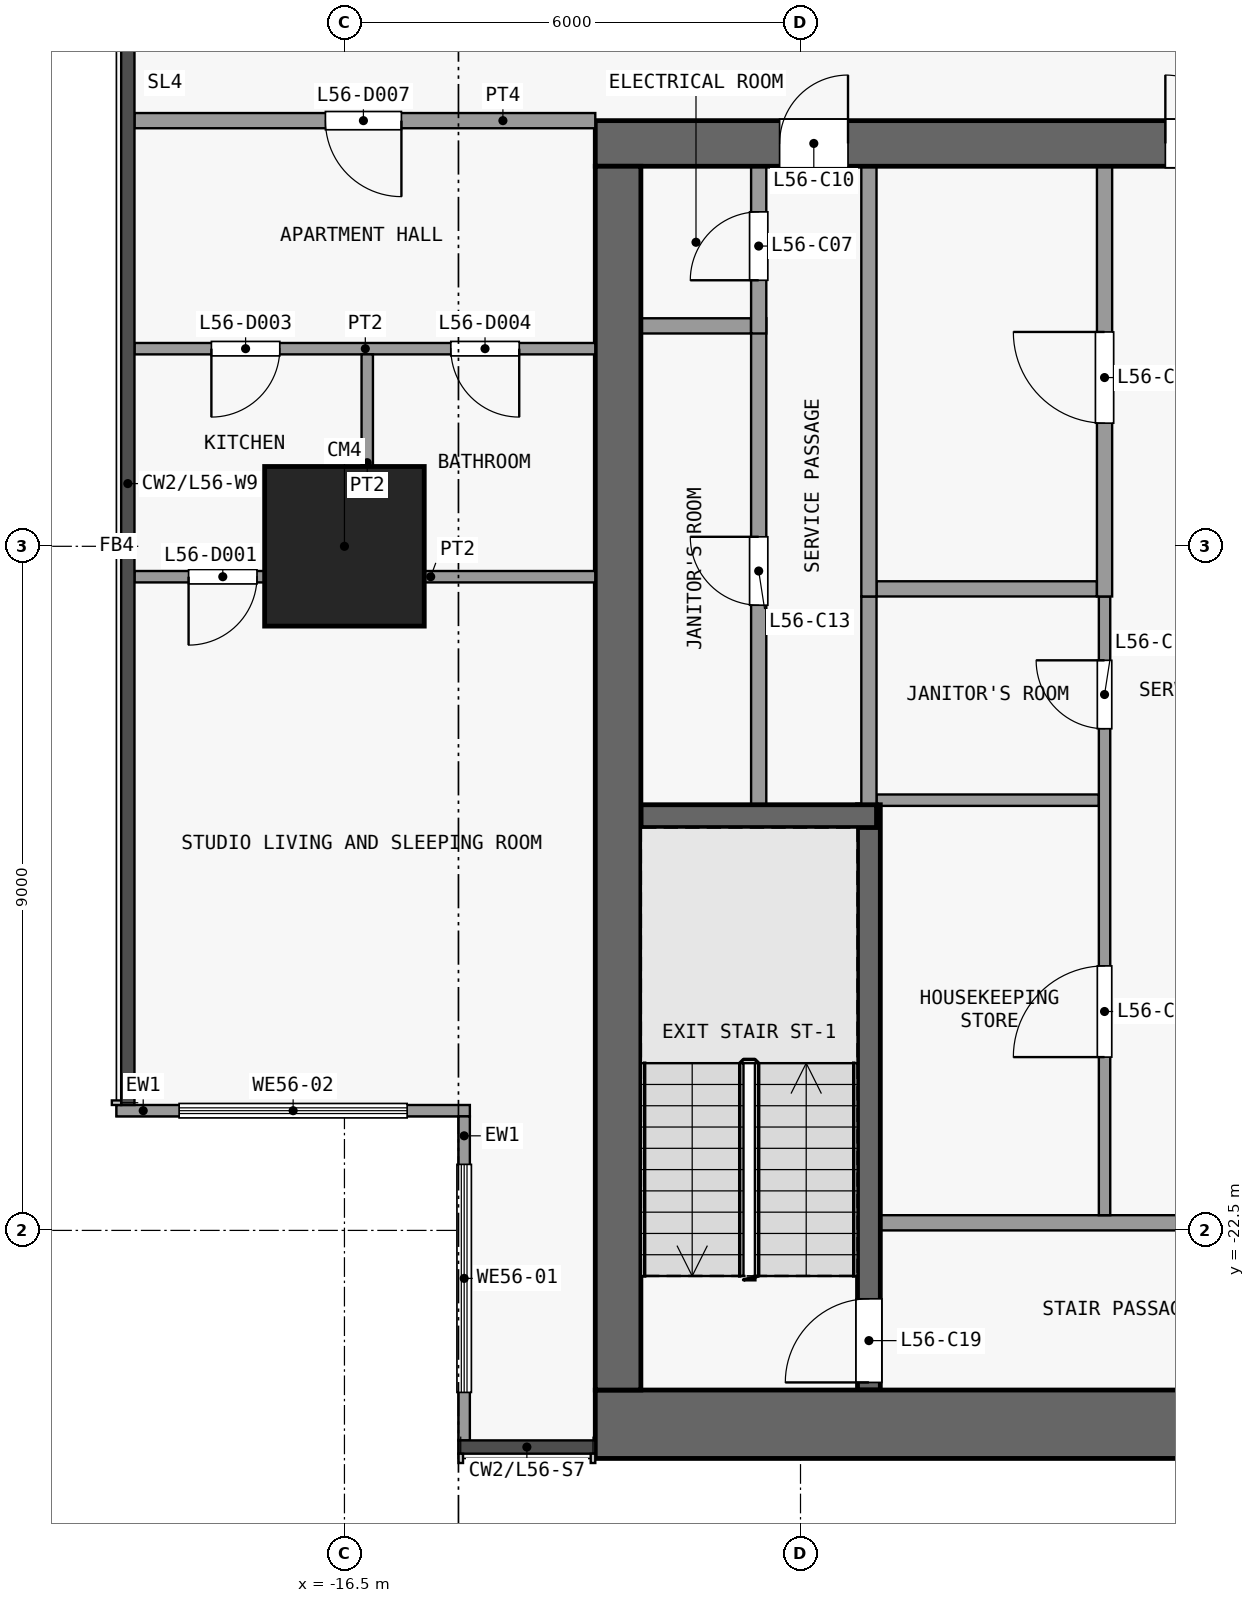
"""IFC4 building model, lengths in metres.
Left out: names, types, materials, properties, quantities, classifications, styles, units other than length and angle.
Written with IfcOpenShell. Run it as: python <this file> out.ifc"""

import sys

from ifc_helpers import new_model, si_unit, direction, frame, frame_2d, origin, origin_2d, place, context, subcontext, project, spatial, rectangle, extrude, element, fill, save


model = new_model("IFC4")
c1 = context("Model", 3, precision=1e-05, world=origin(), true_north=direction((0.0, 1.0)))
c2 = subcontext(c1, "Body", "Model", "MODEL_VIEW")
j1 = project(units=[si_unit("LENGTHUNIT", "METRE"), si_unit("PLANEANGLEUNIT", "RADIAN")], contexts=[c1])
p1 = place(None, origin())
s1 = spatial("IfcSite", under=j1, at=p1, CompositionType="ELEMENT")
p2 = place(p1, origin())
s2 = spatial("IfcBuilding", under=s1, at=p2, CompositionType="ELEMENT")
p3 = place(p2, frame((0.0, 0.0, 223.1)))
s3 = spatial("IfcBuildingStorey", under=s2, at=p3, CompositionType="ELEMENT", Elevation=223.1)
p4 = place(p3, frame((-16.5, -13.5, 0.0), z_axis=(0.0, 0.0, 1.0), x_axis=(1.0, 0.0, 0.0)))
e1 = element("IfcColumn", 1, at=p4, inside=s3, PredefinedType="COLUMN", context=c2, shape_type="SweptSolid", body=[
    extrude(rectangle(XDim=2.1, YDim=2.1, at=origin_2d()), origin(), (0.0, 0.0, 1.0), 3.6),
])
p5 = place(p3, frame((-13.2, -25.05, 0.0), z_axis=(0.0, 0.0, 1.0), x_axis=(1.0, 0.0, 0.0)))
e2 = element("IfcWall", 2, at=p5, inside=s3, PredefinedType="SHEAR", context=c2, shape_type="SweptSolid", body=[
    extrude(rectangle(XDim=26.4, YDim=0.9, at=frame_2d((13.2, 0.0))), origin(), (0.0, 0.0, 1.0), 3.3),
])
p6 = place(p3, frame((-13.2, -8.2, 0.0), z_axis=(0.0, 0.0, 1.0), x_axis=(1.0, 0.0, 0.0)))
e3 = element("IfcWall", 3, at=p6, inside=s3, PredefinedType="SHEAR", context=c2, shape_type="SweptSolid", body=[
    extrude(rectangle(XDim=26.4, YDim=0.6, at=frame_2d((13.2, 0.0))), origin(), (0.0, 0.0, 1.0), 3.3),
])
p7 = place(p6, frame((7.5, 0.0, 0.0)))
e4 = element("IfcOpeningElement", 4, at=p7, cuts=e3, PredefinedType="OPENING", context=c2, shape_type="SweptSolid", body=[
    extrude(rectangle(XDim=1.8, YDim=2.1, at=frame_2d((0.9, 1.05))), frame((0.0, 0.31, 0.0), z_axis=(0.0, -1.0, 0.0), x_axis=(1.0, 0.0, 0.0)), (0.0, 0.0, 1.0), 0.62),
])
p8 = place(p6, frame((17.1, 0.0, 0.0)))
e5 = element("IfcOpeningElement", 5, at=p8, cuts=e3, PredefinedType="OPENING", context=c2, shape_type="SweptSolid", body=[
    extrude(rectangle(XDim=1.8, YDim=2.1, at=frame_2d((0.9, 1.05))), frame((0.0, 0.31, 0.0), z_axis=(0.0, -1.0, 0.0), x_axis=(1.0, 0.0, 0.0)), (0.0, 0.0, 1.0), 0.62),
])
p9 = place(p6, frame((2.425, 0.0, 0.0)))
e6 = element("IfcOpeningElement", 6, at=p9, cuts=e3, PredefinedType="OPENING", context=c2, shape_type="SweptSolid", body=[
    extrude(rectangle(XDim=0.9, YDim=2.1, at=frame_2d((0.45, 1.05))), frame((0.0, 0.31, 0.0), z_axis=(0.0, -1.0, 0.0), x_axis=(1.0, 0.0, 0.0)), (0.0, 0.0, 1.0), 0.62),
])
p10 = place(p6, frame((23.075, 0.0, 0.0)))
e7 = element("IfcOpeningElement", 7, at=p10, cuts=e3, PredefinedType="OPENING", context=c2, shape_type="SweptSolid", body=[
    extrude(rectangle(XDim=0.9, YDim=2.1, at=frame_2d((0.45, 1.05))), frame((0.0, 0.31, 0.0), z_axis=(0.0, -1.0, 0.0), x_axis=(1.0, 0.0, 0.0)), (0.0, 0.0, 1.0), 0.62),
])
p11 = place(p3, frame((-12.9, -24.6, 0.0), z_axis=(0.0, 0.0, 1.0), x_axis=(0.0, 1.0, 0.0)))
e8 = element("IfcWall", 8, at=p11, inside=s3, PredefinedType="SHEAR", context=c2, shape_type="SweptSolid", body=[
    extrude(rectangle(XDim=16.1, YDim=0.6, at=frame_2d((8.05, 0.0))), origin(), (0.0, 0.0, 1.0), 3.3),
])
p12 = place(p3, frame((-3.25, -22.4, 0.0), z_axis=(0.0, 0.0, 1.0), x_axis=(-1.0, 0.0, 0.0)))
e9 = element("IfcWall", 9, at=p12, inside=s3, PredefinedType="PARTITIONING", context=c2, shape_type="SweptSolid", body=[
    extrude(rectangle(XDim=6.2, YDim=0.2, at=frame_2d((3.1, 0.0))), origin(), (0.0, 0.0, 1.0), 3.3),
])
p13 = place(p12, frame((0.8, 0.0, 0.0)))
e10 = element("IfcOpeningElement", 10, at=p13, cuts=e9, PredefinedType="OPENING", context=c2, shape_type="SweptSolid", body=[
    extrude(rectangle(XDim=1.5, YDim=2.1, at=frame_2d((0.75, 1.05))), frame((0.0, 0.11, 0.0), z_axis=(0.0, -1.0, 0.0), x_axis=(1.0, 0.0, 0.0)), (0.0, 0.0, 1.0), 0.22),
])
p14 = place(p3, frame((-12.6, -17.05, 0.0), z_axis=(0.0, 0.0, 1.0), x_axis=(1.0, 0.0, 0.0)))
e11 = element("IfcWall", 11, at=p14, inside=s3, PredefinedType="SHEAR", context=c2, shape_type="SweptSolid", body=[
    extrude(rectangle(XDim=3.1, YDim=0.3, at=frame_2d((1.55, 0.0))), origin(), (0.0, 0.0, 1.0), 3.3),
])
p15 = place(p3, frame((-9.5, -16.84, 0.0), z_axis=(0.0, 0.0, 1.0), x_axis=(1.0, 0.0, 0.0)))
e12 = element("IfcWall", 12, at=p15, inside=s3, PredefinedType="PARTITIONING", context=c2, shape_type="SweptSolid", body=[
    extrude(rectangle(XDim=2.925, YDim=0.15, at=frame_2d((1.462, 0.0))), origin(), (0.0, 0.0, 1.0), 3.3),
])
p16 = place(p3, frame((-9.5, -14.06, 0.0), z_axis=(0.0, 0.0, 1.0), x_axis=(1.0, 0.0, 0.0)))
e13 = element("IfcWall", 13, at=p16, inside=s3, PredefinedType="PARTITIONING", context=c2, shape_type="SweptSolid", body=[
    extrude(rectangle(XDim=2.9, YDim=0.2, at=frame_2d((1.45, 0.0))), origin(), (0.0, 0.0, 1.0), 3.3),
])
p17 = place(p3, frame((-12.6, -10.6, 0.0), z_axis=(0.0, 0.0, 1.0), x_axis=(1.0, 0.0, 0.0)))
e14 = element("IfcWall", 14, at=p17, inside=s3, PredefinedType="PARTITIONING", context=c2, shape_type="SweptSolid", body=[
    extrude(rectangle(XDim=1.45, YDim=0.2, at=frame_2d((0.725, 0.0))), origin(), (0.0, 0.0, 1.0), 3.3),
])
p18 = place(p3, frame((-11.05, -16.9, 0.0), z_axis=(0.0, 0.0, 1.0), x_axis=(0.0, 1.0, 0.0)))
e15 = element("IfcWall", 15, at=p18, inside=s3, PredefinedType="PARTITIONING", context=c2, shape_type="SweptSolid", body=[
    extrude(rectangle(XDim=6.4, YDim=0.2, at=frame_2d((3.2, 0.0))), origin(), (0.0, 0.0, 1.0), 3.3),
])
p19 = place(p18, frame((2.625, 0.0, 0.0)))
e16 = element("IfcOpeningElement", 16, at=p19, cuts=e15, PredefinedType="OPENING", context=c2, shape_type="SweptSolid", body=[
    extrude(rectangle(XDim=0.9, YDim=2.1, at=frame_2d((0.45, 1.05))), frame((0.0, 0.11, 0.0), z_axis=(0.0, -1.0, 0.0), x_axis=(1.0, 0.0, 0.0)), (0.0, 0.0, 1.0), 0.22),
])
p20 = place(p3, frame((-11.05, -10.7, 0.0), z_axis=(0.0, 0.0, 1.0), x_axis=(0.0, 1.0, 0.0)))
e17 = element("IfcWall", 17, at=p20, inside=s3, PredefinedType="PARTITIONING", context=c2, shape_type="SweptSolid", body=[
    extrude(rectangle(XDim=2.2, YDim=0.2, at=frame_2d((1.1, 0.0))), origin(), (0.0, 0.0, 1.0), 3.3),
])
p21 = place(p20, frame((0.7, 0.0, 0.0)))
e18 = element("IfcOpeningElement", 18, at=p21, cuts=e17, PredefinedType="OPENING", context=c2, shape_type="SweptSolid", body=[
    extrude(rectangle(XDim=0.9, YDim=2.1, at=frame_2d((0.45, 1.05))), frame((0.0, 0.11, 0.0), z_axis=(0.0, -1.0, 0.0), x_axis=(1.0, 0.0, 0.0)), (0.0, 0.0, 1.0), 0.22),
])
p22 = place(p3, frame((-9.6, -24.6, 0.0), z_axis=(0.0, 0.0, 1.0), x_axis=(0.0, 1.0, 0.0)))
e19 = element("IfcWall", 19, at=p22, inside=s3, PredefinedType="SHEAR", context=c2, shape_type="SweptSolid", body=[
    extrude(rectangle(XDim=7.7, YDim=0.3, at=frame_2d((3.85, 0.0))), origin(), (0.0, 0.0, 1.0), 3.3),
])
p23 = place(p22, frame((0.1, 0.0, 0.0)))
e20 = element("IfcOpeningElement", 20, at=p23, cuts=e19, PredefinedType="OPENING", context=c2, shape_type="SweptSolid", body=[
    extrude(rectangle(XDim=1.1, YDim=2.1, at=frame_2d((0.55, 1.05))), frame((0.0, 0.16, 0.0), z_axis=(0.0, -1.0, 0.0), x_axis=(1.0, 0.0, 0.0)), (0.0, 0.0, 1.0), 0.32),
])
p24 = place(p3, frame((-9.6, -16.9, 0.0), z_axis=(0.0, 0.0, 1.0), x_axis=(0.0, 1.0, 0.0)))
e21 = element("IfcWall", 21, at=p24, inside=s3, PredefinedType="PARTITIONING", context=c2, shape_type="SweptSolid", body=[
    extrude(rectangle(XDim=2.74, YDim=0.2, at=frame_2d((1.37, 0.0))), origin(), (0.0, 0.0, 1.0), 3.3),
])
p25 = place(p3, frame((-9.6, -14.16, 0.0), z_axis=(0.0, 0.0, 1.0), x_axis=(0.0, 1.0, 0.0)))
e22 = element("IfcWall", 22, at=p25, inside=s3, PredefinedType="PARTITIONING", context=c2, shape_type="SweptSolid", body=[
    extrude(rectangle(XDim=5.66, YDim=0.2, at=frame_2d((2.83, 0.0))), origin(), (0.0, 0.0, 1.0), 3.3),
])
p26 = place(p3, frame((-6.5, -22.3, 0.0), z_axis=(0.0, 0.0, 1.0), x_axis=(0.0, 1.0, 0.0)))
e23 = element("IfcWall", 23, at=p26, inside=s3, PredefinedType="PARTITIONING", context=c2, shape_type="SweptSolid", body=[
    extrude(rectangle(XDim=8.14, YDim=0.15, at=frame_2d((4.07, 0.0))), origin(), (0.0, 0.0, 1.0), 3.3),
])
p27 = place(p26, frame((2.08, 0.0, 0.0)))
e24 = element("IfcOpeningElement", 24, at=p27, cuts=e23, PredefinedType="OPENING", context=c2, shape_type="SweptSolid", body=[
    extrude(rectangle(XDim=1.2, YDim=2.1, at=frame_2d((0.6, 1.05))), frame((0.0, 0.085, 0.0), z_axis=(0.0, -1.0, 0.0), x_axis=(1.0, 0.0, 0.0)), (0.0, 0.0, 1.0), 0.17),
])
p28 = place(p26, frame((6.4, 0.0, 0.0)))
e25 = element("IfcOpeningElement", 25, at=p28, cuts=e23, PredefinedType="OPENING", context=c2, shape_type="SweptSolid", body=[
    extrude(rectangle(XDim=0.9, YDim=2.1, at=frame_2d((0.45, 1.05))), frame((0.0, 0.085, 0.0), z_axis=(0.0, -1.0, 0.0), x_axis=(1.0, 0.0, 0.0)), (0.0, 0.0, 1.0), 0.17),
])
p29 = place(p3, frame((-6.5, -14.16, 0.0), z_axis=(0.0, 0.0, 1.0), x_axis=(0.0, 1.0, 0.0)))
e26 = element("IfcWall", 26, at=p29, inside=s3, PredefinedType="PARTITIONING", context=c2, shape_type="SweptSolid", body=[
    extrude(rectangle(XDim=5.66, YDim=0.2, at=frame_2d((2.83, 0.0))), origin(), (0.0, 0.0, 1.0), 3.3),
])
p30 = place(p29, frame((2.28, 0.0, 0.0)))
e27 = element("IfcOpeningElement", 27, at=p30, cuts=e26, PredefinedType="OPENING", context=c2, shape_type="SweptSolid", body=[
    extrude(rectangle(XDim=1.2, YDim=2.1, at=frame_2d((0.6, 1.05))), frame((0.0, 0.11, 0.0), z_axis=(0.0, -1.0, 0.0), x_axis=(1.0, 0.0, 0.0)), (0.0, 0.0, 1.0), 0.22),
])
p31 = place(p3, frame((-14.925, -25.262, 0.0), z_axis=(0.0, 0.0, 1.0), x_axis=(0.0, 1.0, 0.0)))
e28 = element("IfcWall", 28, at=p31, inside=s3, PredefinedType="SOLIDWALL", context=c2, shape_type="SweptSolid", body=[
    extrude(rectangle(XDim=4.262, YDim=0.15, at=frame_2d((2.131, 0.0))), origin(), (0.0, 0.0, 1.0), 3.3),
])
p32 = place(p31, frame((0.631, 0.0, 0.9)))
e29 = element("IfcOpeningElement", 29, at=p32, cuts=e28, PredefinedType="OPENING", context=c2, shape_type="SweptSolid", body=[
    extrude(rectangle(XDim=3.0, YDim=2.4, at=frame_2d((1.5, 1.2))), frame((0.0, 0.085, 0.0), z_axis=(0.0, -1.0, 0.0), x_axis=(1.0, 0.0, 0.0)), (0.0, 0.0, 1.0), 0.17),
])
p33 = place(p3, frame((-14.85, -20.925, 0.0), z_axis=(0.0, 0.0, 1.0), x_axis=(-1.0, 0.0, 0.0)))
e30 = element("IfcWall", 30, at=p33, inside=s3, PredefinedType="SOLIDWALL", context=c2, shape_type="SweptSolid", body=[
    extrude(rectangle(XDim=4.65, YDim=0.15, at=frame_2d((2.325, 0.0))), origin(), (0.0, 0.0, 1.0), 3.3),
])
p34 = place(p33, frame((0.825, 0.0, 0.9)))
e31 = element("IfcOpeningElement", 31, at=p34, cuts=e30, PredefinedType="OPENING", context=c2, shape_type="SweptSolid", body=[
    extrude(rectangle(XDim=3.0, YDim=2.4, at=frame_2d((1.5, 1.2))), frame((0.0, 0.085, 0.0), z_axis=(0.0, -1.0, 0.0), x_axis=(1.0, 0.0, 0.0)), (0.0, 0.0, 1.0), 0.17),
])
p35 = place(p3, frame((-19.262, -13.9, 0.0), z_axis=(0.0, 0.0, 1.0), x_axis=(1.0, 0.0, 0.0)))
e32 = element("IfcWall", 32, at=p35, inside=s3, PredefinedType="PARTITIONING", context=c2, shape_type="SweptSolid", body=[
    extrude(rectangle(XDim=6.062, YDim=0.15, at=frame_2d((3.031, 0.0))), origin(), (0.0, 0.0, 1.0), 3.3),
])
p36 = place(p35, frame((0.712, 0.0, 0.0)))
e33 = element("IfcOpeningElement", 33, at=p36, cuts=e32, PredefinedType="OPENING", context=c2, shape_type="SweptSolid", body=[
    extrude(rectangle(XDim=0.9, YDim=2.1, at=frame_2d((0.45, 1.05))), frame((0.0, 0.085, 0.0), z_axis=(0.0, -1.0, 0.0), x_axis=(1.0, 0.0, 0.0)), (0.0, 0.0, 1.0), 0.17),
])
p37 = place(p3, frame((-19.262, -10.9, 0.0), z_axis=(0.0, 0.0, 1.0), x_axis=(1.0, 0.0, 0.0)))
e34 = element("IfcWall", 34, at=p37, inside=s3, PredefinedType="PARTITIONING", context=c2, shape_type="SweptSolid", body=[
    extrude(rectangle(XDim=6.062, YDim=0.15, at=frame_2d((3.031, 0.0))), origin(), (0.0, 0.0, 1.0), 3.3),
])
p38 = place(p37, frame((1.012, 0.0, 0.0)))
e35 = element("IfcOpeningElement", 35, at=p38, cuts=e34, PredefinedType="OPENING", context=c2, shape_type="SweptSolid", body=[
    extrude(rectangle(XDim=0.9, YDim=2.1, at=frame_2d((0.45, 1.05))), frame((0.0, 0.085, 0.0), z_axis=(0.0, -1.0, 0.0), x_axis=(1.0, 0.0, 0.0)), (0.0, 0.0, 1.0), 0.17),
])
p39 = place(p37, frame((4.162, 0.0, 0.0)))
e36 = element("IfcOpeningElement", 36, at=p39, cuts=e34, PredefinedType="OPENING", context=c2, shape_type="SweptSolid", body=[
    extrude(rectangle(XDim=0.9, YDim=2.1, at=frame_2d((0.45, 1.05))), frame((0.0, 0.085, 0.0), z_axis=(0.0, -1.0, 0.0), x_axis=(1.0, 0.0, 0.0)), (0.0, 0.0, 1.0), 0.17),
])
p40 = place(p3, frame((-19.262, -7.9, 0.0), z_axis=(0.0, 0.0, 1.0), x_axis=(1.0, 0.0, 0.0)))
e37 = element("IfcWall", 37, at=p40, inside=s3, PredefinedType="PARTITIONING", context=c2, shape_type="SweptSolid", body=[
    extrude(rectangle(XDim=6.062, YDim=0.2, at=frame_2d((3.031, 0.0))), origin(), (0.0, 0.0, 1.0), 3.3),
])
p41 = place(p40, frame((2.512, 0.0, 0.0)))
e38 = element("IfcOpeningElement", 38, at=p41, cuts=e37, PredefinedType="OPENING", context=c2, shape_type="SweptSolid", body=[
    extrude(rectangle(XDim=1.0, YDim=2.1, at=frame_2d((0.5, 1.05))), frame((0.0, 0.11, 0.0), z_axis=(0.0, -1.0, 0.0), x_axis=(1.0, 0.0, 0.0)), (0.0, 0.0, 1.0), 0.22),
])
p42 = place(p3, frame((-16.2, -13.825, 0.0), z_axis=(0.0, 0.0, 1.0), x_axis=(0.0, 1.0, 0.0)))
e39 = element("IfcWall", 39, at=p42, inside=s3, PredefinedType="PARTITIONING", context=c2, shape_type="SweptSolid", body=[
    extrude(rectangle(XDim=2.85, YDim=0.15, at=frame_2d((1.425, 0.0))), origin(), (0.0, 0.0, 1.0), 3.3),
])
p43 = place(p7, origin())
e40 = element("IfcDoor", 40, at=p43, inside=s3, OperationType="DOUBLE_DOOR_SINGLE_SWING", PredefinedType="DOOR", context=c2, shape_type="SweptSolid", body=[
    extrude(rectangle(XDim=1.8, YDim=2.1, at=frame_2d((0.9, 1.05))), frame((0.0, 0.025, 0.0), z_axis=(0.0, -1.0, 0.0), x_axis=(1.0, 0.0, 0.0)), (0.0, 0.0, 1.0), 0.05),
])
fill(e4, e40)
p44 = place(p21, origin())
e41 = element("IfcDoor", 41, at=p44, inside=s3, OperationType="SINGLE_SWING_LEFT", PredefinedType="DOOR", context=c2, shape_type="SweptSolid", body=[
    extrude(rectangle(XDim=0.9, YDim=2.1, at=frame_2d((0.45, 1.05))), frame((0.0, 0.025, 0.0), z_axis=(0.0, -1.0, 0.0), x_axis=(1.0, 0.0, 0.0)), (0.0, 0.0, 1.0), 0.05),
])
fill(e18, e41)
p45 = place(p30, origin())
e42 = element("IfcDoor", 42, at=p45, inside=s3, OperationType="SINGLE_SWING_RIGHT", PredefinedType="DOOR", context=c2, shape_type="SweptSolid", body=[
    extrude(rectangle(XDim=1.2, YDim=2.1, at=frame_2d((0.6, 1.05))), frame((0.0, 0.025, 0.0), z_axis=(0.0, -1.0, 0.0), x_axis=(1.0, 0.0, 0.0)), (0.0, 0.0, 1.0), 0.05),
])
fill(e27, e42)
p46 = place(p9, origin())
e43 = element("IfcDoor", 43, at=p46, inside=s3, OperationType="SINGLE_SWING_RIGHT", PredefinedType="DOOR", context=c2, shape_type="SweptSolid", body=[
    extrude(rectangle(XDim=0.9, YDim=2.1, at=frame_2d((0.45, 1.05))), frame((0.0, 0.025, 0.0), z_axis=(0.0, -1.0, 0.0), x_axis=(1.0, 0.0, 0.0)), (0.0, 0.0, 1.0), 0.05),
])
fill(e6, e43)
p47 = place(p19, origin())
e44 = element("IfcDoor", 44, at=p47, inside=s3, OperationType="SINGLE_SWING_RIGHT", PredefinedType="DOOR", context=c2, shape_type="SweptSolid", body=[
    extrude(rectangle(XDim=0.9, YDim=2.1, at=frame_2d((0.45, 1.05))), frame((0.0, 0.025, 0.0), z_axis=(0.0, -1.0, 0.0), x_axis=(1.0, 0.0, 0.0)), (0.0, 0.0, 1.0), 0.05),
])
fill(e16, e44)
p48 = place(p27, origin())
e45 = element("IfcDoor", 45, at=p48, inside=s3, OperationType="SINGLE_SWING_LEFT", PredefinedType="DOOR", context=c2, shape_type="SweptSolid", body=[
    extrude(rectangle(XDim=1.2, YDim=2.1, at=frame_2d((0.6, 1.05))), frame((0.0, 0.025, 0.0), z_axis=(0.0, -1.0, 0.0), x_axis=(1.0, 0.0, 0.0)), (0.0, 0.0, 1.0), 0.05),
])
fill(e24, e45)
p49 = place(p28, origin())
e46 = element("IfcDoor", 46, at=p49, inside=s3, OperationType="SINGLE_SWING_RIGHT", PredefinedType="DOOR", context=c2, shape_type="SweptSolid", body=[
    extrude(rectangle(XDim=0.9, YDim=2.1, at=frame_2d((0.45, 1.05))), frame((0.0, 0.025, 0.0), z_axis=(0.0, -1.0, 0.0), x_axis=(1.0, 0.0, 0.0)), (0.0, 0.0, 1.0), 0.05),
])
fill(e25, e46)
p50 = place(p23, origin())
e47 = element("IfcDoor", 47, at=p50, inside=s3, OperationType="SINGLE_SWING_LEFT", PredefinedType="DOOR", context=c2, shape_type="SweptSolid", body=[
    extrude(rectangle(XDim=1.1, YDim=2.1, at=frame_2d((0.55, 1.05))), frame((0.0, 0.025, 0.0), z_axis=(0.0, -1.0, 0.0), x_axis=(1.0, 0.0, 0.0)), (0.0, 0.0, 1.0), 0.05),
])
fill(e20, e47)
p51 = place(p32, origin())
e48 = element("IfcWindow", 48, at=p51, inside=s3, PartitioningType="SINGLE_PANEL", PredefinedType="WINDOW", context=c2, shape_type="SweptSolid", body=[
    extrude(rectangle(XDim=3.0, YDim=2.4, at=frame_2d((1.5, 1.2))), frame((0.0, 0.03, 0.0), z_axis=(0.0, -1.0, 0.0), x_axis=(1.0, 0.0, 0.0)), (0.0, 0.0, 1.0), 0.06),
])
fill(e29, e48)
p52 = place(p34, origin())
e49 = element("IfcWindow", 49, at=p52, inside=s3, PartitioningType="SINGLE_PANEL", PredefinedType="WINDOW", context=c2, shape_type="SweptSolid", body=[
    extrude(rectangle(XDim=3.0, YDim=2.4, at=frame_2d((1.5, 1.2))), frame((0.0, 0.03, 0.0), z_axis=(0.0, -1.0, 0.0), x_axis=(1.0, 0.0, 0.0)), (0.0, 0.0, 1.0), 0.06),
])
fill(e31, e49)
p53 = place(p36, origin())
e50 = element("IfcDoor", 50, at=p53, inside=s3, OperationType="SINGLE_SWING_LEFT", PredefinedType="DOOR", context=c2, shape_type="SweptSolid", body=[
    extrude(rectangle(XDim=0.9, YDim=2.1, at=frame_2d((0.45, 1.05))), frame((0.0, 0.025, 0.0), z_axis=(0.0, -1.0, 0.0), x_axis=(1.0, 0.0, 0.0)), (0.0, 0.0, 1.0), 0.05),
])
fill(e33, e50)
p54 = place(p38, origin())
e51 = element("IfcDoor", 51, at=p54, inside=s3, OperationType="SINGLE_SWING_LEFT", PredefinedType="DOOR", context=c2, shape_type="SweptSolid", body=[
    extrude(rectangle(XDim=0.9, YDim=2.1, at=frame_2d((0.45, 1.05))), frame((0.0, 0.025, 0.0), z_axis=(0.0, -1.0, 0.0), x_axis=(1.0, 0.0, 0.0)), (0.0, 0.0, 1.0), 0.05),
])
fill(e35, e51)
p55 = place(p39, origin())
e52 = element("IfcDoor", 52, at=p55, inside=s3, OperationType="SINGLE_SWING_RIGHT", PredefinedType="DOOR", context=c2, shape_type="SweptSolid", body=[
    extrude(rectangle(XDim=0.9, YDim=2.1, at=frame_2d((0.45, 1.05))), frame((0.0, 0.025, 0.0), z_axis=(0.0, -1.0, 0.0), x_axis=(1.0, 0.0, 0.0)), (0.0, 0.0, 1.0), 0.05),
])
fill(e36, e52)
p56 = place(p41, origin())
e53 = element("IfcDoor", 53, at=p56, inside=s3, OperationType="SINGLE_SWING_RIGHT", PredefinedType="DOOR", context=c2, shape_type="SweptSolid", body=[
    extrude(rectangle(XDim=1.0, YDim=2.1, at=frame_2d((0.5, 1.05))), frame((0.0, 0.025, 0.0), z_axis=(0.0, -1.0, 0.0), x_axis=(1.0, 0.0, 0.0)), (0.0, 0.0, 1.0), 0.05),
])
fill(e38, e53)
save(model, sys.argv[1])
